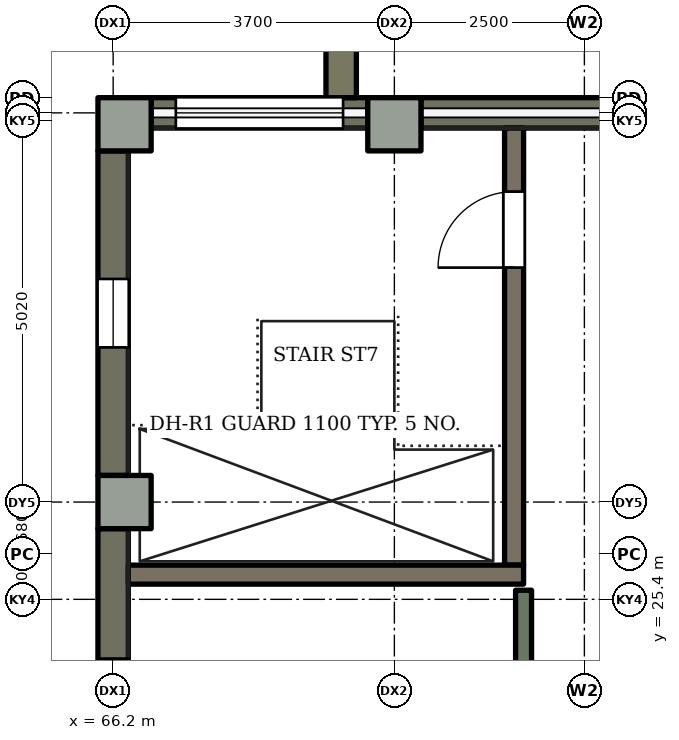
"""IFC4 building model, lengths in metres.
Left out: names, types, materials, properties, quantities, classifications, styles, units other than length and angle.
Written with IfcOpenShell. Run it as: python <this file> out.ifc"""

import sys

from ifc_helpers import new_model, si_unit, direction, frame, frame_2d, origin, origin_2d, place, context, subcontext, project, spatial, rectangle, extrude, element, fill, save


model = new_model("IFC4")
c1 = context("Model", 3, precision=1e-05, world=origin(), true_north=direction((0.0, 1.0)))
c2 = subcontext(c1, "Body", "Model", "MODEL_VIEW")
j1 = project(units=[si_unit("LENGTHUNIT", "METRE"), si_unit("PLANEANGLEUNIT", "RADIAN")], contexts=[c1])
p1 = place(None, origin())
s1 = spatial("IfcSite", under=j1, at=p1, CompositionType="ELEMENT")
p2 = place(p1, origin())
s2 = spatial("IfcBuilding", under=s1, at=p2, CompositionType="ELEMENT")
p3 = place(p2, frame((0.0, 0.0, 4.2)))
s3 = spatial("IfcBuildingStorey", under=s2, at=p3, CompositionType="ELEMENT", Elevation=4.2)
p4 = place(p3, frame((66.35, 31.65, 0.0), z_axis=(0.0, 0.0, 1.0), x_axis=(1.0, 0.0, 0.0)))
e1 = element("IfcColumn", 1, at=p4, inside=s3, PredefinedType="COLUMN", context=c2, shape_type="SweptSolid", body=[
    extrude(rectangle(XDim=0.7, YDim=0.7, at=origin_2d()), origin(), (0.0, 0.0, 1.0), 4.2),
])
p5 = place(p3, frame((69.9, 31.65, 0.0), z_axis=(0.0, 0.0, 1.0), x_axis=(1.0, 0.0, 0.0)))
e2 = element("IfcColumn", 2, at=p5, inside=s3, PredefinedType="COLUMN", context=c2, shape_type="SweptSolid", body=[
    extrude(rectangle(XDim=0.7, YDim=0.7, at=origin_2d()), origin(), (0.0, 0.0, 1.0), 3.3),
])
p6 = place(p3, frame((66.35, 26.68, 0.0), z_axis=(0.0, 0.0, 1.0), x_axis=(1.0, 0.0, 0.0)))
e3 = element("IfcColumn", 3, at=p6, inside=s3, PredefinedType="COLUMN", context=c2, shape_type="SweptSolid", body=[
    extrude(rectangle(XDim=0.7, YDim=0.7, at=origin_2d()), origin(), (0.0, 0.0, 1.0), 4.2),
])
p7 = place(p3, frame((66.7, 31.8, 0.0), z_axis=(0.0, 0.0, 1.0), x_axis=(1.0, 0.0, 0.0)))
e4 = element("IfcWall", 4, at=p7, inside=s3, PredefinedType="SOLIDWALL", context=c2, shape_type="SweptSolid", body=[
    extrude(rectangle(XDim=2.85, YDim=0.4, at=frame_2d((1.425, 0.0))), origin(), (0.0, 0.0, 1.0), 3.3),
])
p8 = place(p7, frame((0.325, 0.0, 0.6)))
e5 = element("IfcOpeningElement", 5, at=p8, cuts=e4, PredefinedType="OPENING", context=c2, shape_type="SweptSolid", body=[
    extrude(rectangle(XDim=2.2, YDim=2.4, at=frame_2d((1.1, 1.2))), frame((0.0, 0.21, 0.0), z_axis=(0.0, -1.0, 0.0), x_axis=(1.0, 0.0, 0.0)), (0.0, 0.0, 1.0), 0.42),
])
p9 = place(p3, frame((70.25, 31.8, 0.0), z_axis=(0.0, 0.0, 1.0), x_axis=(1.0, 0.0, 0.0)))
e6 = element("IfcWall", 6, at=p9, inside=s3, PredefinedType="SOLIDWALL", context=c2, shape_type="SweptSolid", body=[
    extrude(rectangle(XDim=3.0, YDim=0.4, at=frame_2d((1.5, 0.0))), origin(), (0.0, 0.0, 1.0), 3.3),
])
p10 = place(p3, frame((66.2, 21.91, 0.0), z_axis=(0.0, 0.0, 1.0), x_axis=(0.0, 1.0, 0.0)))
e7 = element("IfcWall", 7, at=p10, inside=s3, PredefinedType="SOLIDWALL", context=c2, shape_type="SweptSolid", body=[
    extrude(rectangle(XDim=4.42, YDim=0.4, at=frame_2d((2.21, 0.0))), origin(), (0.0, 0.0, 1.0), 4.2),
])
p11 = place(p10, frame((1.71, 0.0, 0.6)))
e8 = element("IfcOpeningElement", 8, at=p11, cuts=e7, PredefinedType="OPENING", context=c2, shape_type="SweptSolid", body=[
    extrude(rectangle(XDim=1.0, YDim=2.4, at=frame_2d((0.5, 1.2))), frame((0.0, 0.21, 0.0), z_axis=(0.0, -1.0, 0.0), x_axis=(1.0, 0.0, 0.0)), (0.0, 0.0, 1.0), 0.42),
])
p12 = place(p3, frame((66.2, 27.03, 0.0), z_axis=(0.0, 0.0, 1.0), x_axis=(0.0, 1.0, 0.0)))
e9 = element("IfcWall", 9, at=p12, inside=s3, PredefinedType="SOLIDWALL", context=c2, shape_type="SweptSolid", body=[
    extrude(rectangle(XDim=4.27, YDim=0.4, at=frame_2d((2.135, 0.0))), origin(), (0.0, 0.0, 1.0), 4.2),
])
p13 = place(p12, frame((1.685, 0.0, 0.9)))
e10 = element("IfcOpeningElement", 10, at=p13, cuts=e9, PredefinedType="OPENING", context=c2, shape_type="SweptSolid", body=[
    extrude(rectangle(XDim=0.9, YDim=1.8, at=frame_2d((0.45, 0.9))), frame((0.0, 0.21, 0.0), z_axis=(0.0, -1.0, 0.0), x_axis=(1.0, 0.0, 0.0)), (0.0, 0.0, 1.0), 0.42),
])
p14 = place(p3, frame((71.475, 25.85, 0.0), z_axis=(0.0, 0.0, 1.0), x_axis=(0.0, 1.0, 0.0)))
e11 = element("IfcWall", 11, at=p14, inside=s3, PredefinedType="SHEAR", context=c2, shape_type="SweptSolid", body=[
    extrude(rectangle(XDim=5.75, YDim=0.25, at=frame_2d((2.875, 0.0))), origin(), (0.0, 0.0, 1.0), 3.1),
])
p15 = place(p14, frame((3.914, 0.0, 0.0)))
e12 = element("IfcOpeningElement", 12, at=p15, cuts=e11, PredefinedType="OPENING", context=c2, shape_type="SweptSolid", body=[
    extrude(rectangle(XDim=1.0, YDim=2.1, at=frame_2d((0.5, 1.05))), frame((0.0, 0.135, 0.0), z_axis=(0.0, -1.0, 0.0), x_axis=(1.0, 0.0, 0.0)), (0.0, 0.0, 1.0), 0.27),
])
p16 = place(p3, frame((66.4, 25.725, 0.0), z_axis=(0.0, 0.0, 1.0), x_axis=(1.0, 0.0, 0.0)))
e13 = element("IfcWall", 13, at=p16, inside=s3, PredefinedType="SHEAR", context=c2, shape_type="SweptSolid", body=[
    extrude(rectangle(XDim=5.2, YDim=0.25, at=frame_2d((2.6, 0.0))), origin(), (0.0, 0.0, 1.0), 3.1),
])
p17 = place(p3, frame((69.2, 34.3, 0.0), z_axis=(0.0, 0.0, 1.0), x_axis=(0.0, -1.0, 0.0)))
e14 = element("IfcWall", 14, at=p17, inside=s3, PredefinedType="STANDARD", context=c2, shape_type="SweptSolid", body=[
    extrude(rectangle(XDim=2.3, YDim=0.4, at=frame_2d((1.15, 0.0))), origin(), (0.0, 0.0, 1.0), 3.7),
])
for number, where, z_axis, x_axis in (
    (15, (66.4, 26.95, 0.0), (0.0, 0.0, 1.0), (0.0, -1.0, 0.0)),
    (16, (70.17, 31.6, 0.0), (0.0, 0.0, 1.0), (-1.0, 0.0, 0.0)),
):
    element("IfcWall", number, at=place(p3, frame(where, z_axis=z_axis, x_axis=x_axis)), inside=s3, PredefinedType="PARTITIONING", context=c2, shape_type="SweptSolid", body=[
        extrude(rectangle(XDim=0.54, YDim=0.21, at=frame_2d((0.27, 0.0))), origin(), (0.0, 0.0, 1.0), 3.1),
    ])
p18 = place(p3, frame((71.6, 18.105, 0.0), z_axis=(0.0, 0.0, 1.0), x_axis=(0.0, 1.0, 0.0)))
e17 = element("IfcWall", 17, at=p18, inside=s3, PredefinedType="PARTITIONING", context=c2, shape_type="SweptSolid", body=[
    extrude(rectangle(XDim=7.415, YDim=0.21, at=frame_2d((3.708, 0.0))), origin(), (0.0, 0.0, 1.0), 3.1),
])
p19 = place(p18, frame((3.145, 0.0, 0.0)))
e18 = element("IfcOpeningElement", 18, at=p19, cuts=e17, PredefinedType="OPENING", context=c2, shape_type="SweptSolid", body=[
    extrude(rectangle(XDim=1.0, YDim=2.1, at=frame_2d((0.5, 1.05))), frame((0.0, 0.115, 0.0), z_axis=(0.0, -1.0, 0.0), x_axis=(1.0, 0.0, 0.0)), (0.0, 0.0, 1.0), 0.23),
])
p20 = place(p8, origin())
e19 = element("IfcWindow", 19, at=p20, inside=s3, PartitioningType="SINGLE_PANEL", PredefinedType="WINDOW", context=c2, shape_type="SweptSolid", body=[
    extrude(rectangle(XDim=2.2, YDim=2.4, at=frame_2d((1.1, 1.2))), frame((0.0, 0.03, 0.0), z_axis=(0.0, -1.0, 0.0), x_axis=(1.0, 0.0, 0.0)), (0.0, 0.0, 1.0), 0.06),
])
fill(e5, e19)
p21 = place(p11, origin())
e20 = element("IfcWindow", 20, at=p21, inside=s3, PartitioningType="SINGLE_PANEL", PredefinedType="WINDOW", context=c2, shape_type="SweptSolid", body=[
    extrude(rectangle(XDim=1.0, YDim=2.4, at=frame_2d((0.5, 1.2))), frame((0.0, 0.03, 0.0), z_axis=(0.0, -1.0, 0.0), x_axis=(1.0, 0.0, 0.0)), (0.0, 0.0, 1.0), 0.06),
])
fill(e8, e20)
p22 = place(p13, origin())
e21 = element("IfcWindow", 21, at=p22, inside=s3, PartitioningType="SINGLE_PANEL", PredefinedType="WINDOW", context=c2, shape_type="SweptSolid", body=[
    extrude(rectangle(XDim=0.9, YDim=1.8, at=frame_2d((0.45, 0.9))), frame((0.0, 0.03, 0.0), z_axis=(0.0, -1.0, 0.0), x_axis=(1.0, 0.0, 0.0)), (0.0, 0.0, 1.0), 0.06),
])
fill(e10, e21)
p23 = place(p15, origin())
e22 = element("IfcDoor", 22, at=p23, inside=s3, OperationType="SINGLE_SWING_LEFT", PredefinedType="DOOR", context=c2, shape_type="SweptSolid", body=[
    extrude(rectangle(XDim=1.0, YDim=2.1, at=frame_2d((0.5, 1.05))), frame((0.0, 0.025, 0.0), z_axis=(0.0, -1.0, 0.0), x_axis=(1.0, 0.0, 0.0)), (0.0, 0.0, 1.0), 0.05),
])
fill(e12, e22)
save(model, sys.argv[1])
